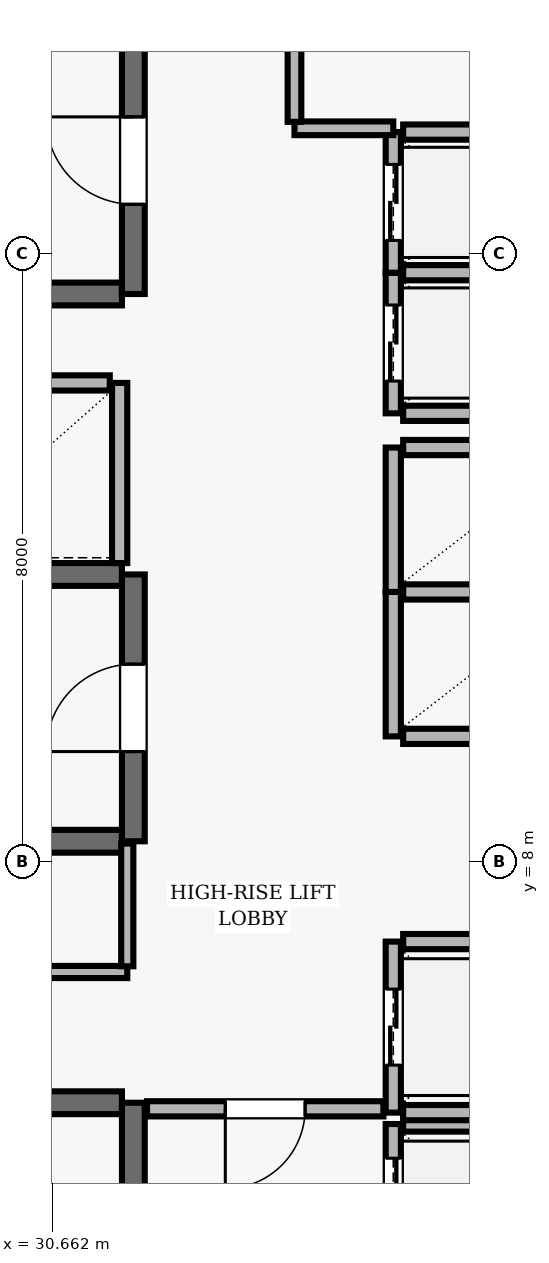
"""IFC4 building model, lengths in metres.
Left out: names, types, materials, properties, quantities, classifications, styles, units other than length and angle.
Written with IfcOpenShell. Run it as: python <this file> out.ifc"""

import sys

from ifc_helpers import new_model, si_unit, direction, frame, frame_2d, origin, place, context, subcontext, project, spatial, rectangle, extrude, element, fill, save


model = new_model("IFC4")
c1 = context("Model", 3, precision=1e-05, world=origin(), true_north=direction((0.0, 1.0)))
c2 = subcontext(c1, "Body", "Model", "MODEL_VIEW")
j1 = project(units=[si_unit("LENGTHUNIT", "METRE"), si_unit("PLANEANGLEUNIT", "RADIAN")], contexts=[c1])
p1 = place(None, origin())
s1 = spatial("IfcSite", under=j1, at=p1, CompositionType="ELEMENT")
p2 = place(p1, origin())
s2 = spatial("IfcBuilding", under=s1, at=p2, CompositionType="ELEMENT")
p3 = place(p2, frame((0.0, 0.0, 306.7)))
s3 = spatial("IfcBuildingStorey", under=s2, at=p3, CompositionType="ELEMENT", Elevation=306.7)
p4 = place(p3, frame((31.58, 4.83, 0.0), z_axis=(0.0, 0.0, 1.0), x_axis=(-1.0, 0.0, 0.0)))
e1 = element("IfcWall", 1, at=p4, inside=s3, PredefinedType="SHEAR", context=c2, shape_type="SweptSolid", body=[
    extrude(rectangle(XDim=8.36, YDim=0.3, at=frame_2d((4.18, 0.0))), origin(), (0.0, 0.0, 1.0), 4.74),
])
p5 = place(p3, frame((31.73, 0.96, 0.0), z_axis=(0.0, 0.0, 1.0), x_axis=(0.0, 1.0, 0.0)))
e2 = element("IfcWall", 2, at=p5, inside=s3, PredefinedType="SHEAR", context=c2, shape_type="SweptSolid", body=[
    extrude(rectangle(XDim=3.87, YDim=0.3, at=frame_2d((1.935, 0.0))), origin(), (0.0, 0.0, 1.0), 4.74),
])
p6 = place(p5, frame((1.54, 0.0, 0.0)))
e3 = element("IfcOpeningElement", 3, at=p6, cuts=e2, PredefinedType="OPENING", context=c2, shape_type="SweptSolid", body=[
    extrude(rectangle(XDim=1.15, YDim=2.15, at=frame_2d((0.575, 1.075))), frame((0.0, 0.16, 0.0), z_axis=(0.0, -1.0, 0.0), x_axis=(1.0, 0.0, 0.0)), (0.0, 0.0, 1.0), 0.32),
])
p7 = place(p3, frame((23.22, 15.47, 0.0), z_axis=(0.0, 0.0, 1.0), x_axis=(1.0, 0.0, 0.0)))
e4 = element("IfcWall", 4, at=p7, inside=s3, PredefinedType="SHEAR", context=c2, shape_type="SweptSolid", body=[
    extrude(rectangle(XDim=8.36, YDim=0.3, at=frame_2d((4.18, 0.0))), origin(), (0.0, 0.0, 1.0), 4.74),
])
p8 = place(p3, frame((31.73, 15.47, 0.0), z_axis=(0.0, 0.0, 1.0), x_axis=(0.0, 1.0, 0.0)))
e5 = element("IfcWall", 5, at=p8, inside=s3, PredefinedType="SHEAR", context=c2, shape_type="SweptSolid", body=[
    extrude(rectangle(XDim=3.51, YDim=0.3, at=frame_2d((1.755, 0.0))), origin(), (0.0, 0.0, 1.0), 4.74),
])
p9 = place(p8, frame((1.18, 0.0, 0.0)))
e6 = element("IfcOpeningElement", 6, at=p9, cuts=e5, PredefinedType="OPENING", context=c2, shape_type="SweptSolid", body=[
    extrude(rectangle(XDim=1.15, YDim=2.15, at=frame_2d((0.575, 1.075))), frame((0.0, 0.16, 0.0), z_axis=(0.0, -1.0, 0.0), x_axis=(1.0, 0.0, 0.0)), (0.0, 0.0, 1.0), 0.32),
])
for number, where, z_axis, x_axis in (
    (7, (31.58, 11.78, 0.0), (0.0, 0.0, 1.0), (-1.0, 0.0, 0.0)),
    (8, (23.22, 8.27, 0.0), (0.0, 0.0, 1.0), (1.0, 0.0, 0.0)),
):
    element("IfcWall", number, at=place(p3, frame(where, z_axis=z_axis, x_axis=x_axis)), inside=s3, PredefinedType="SHEAR", context=c2, shape_type="SweptSolid", body=[
        extrude(rectangle(XDim=8.36, YDim=0.3, at=frame_2d((4.18, 0.0))), origin(), (0.0, 0.0, 1.0), 4.74),
    ])
p10 = place(p3, frame((31.73, 8.27, 0.0), z_axis=(0.0, 0.0, 1.0), x_axis=(0.0, 1.0, 0.0)))
e9 = element("IfcWall", 9, at=p10, inside=s3, PredefinedType="SHEAR", context=c2, shape_type="SweptSolid", body=[
    extrude(rectangle(XDim=3.51, YDim=0.3, at=frame_2d((1.755, 0.0))), origin(), (0.0, 0.0, 1.0), 4.74),
])
p11 = place(p10, frame((1.18, 0.0, 0.0)))
e10 = element("IfcOpeningElement", 10, at=p11, cuts=e9, PredefinedType="OPENING", context=c2, shape_type="SweptSolid", body=[
    extrude(rectangle(XDim=1.15, YDim=2.15, at=frame_2d((0.575, 1.075))), frame((0.0, 0.16, 0.0), z_axis=(0.0, -1.0, 0.0), x_axis=(1.0, 0.0, 0.0)), (0.0, 0.0, 1.0), 0.32),
])
p12 = place(p3, frame((35.15, 4.55, 0.0), z_axis=(0.0, 0.0, 1.0), x_axis=(0.0, -1.0, 0.0)))
e11 = element("IfcWall", 11, at=p12, inside=s3, PredefinedType="SOLIDWALL", context=c2, shape_type="SweptSolid", body=[
    extrude(rectangle(XDim=2.1, YDim=0.2, at=frame_2d((1.05, 0.0))), origin(), (0.0, 0.0, 1.0), 4.74),
])
p13 = place(p12, frame((0.45, 0.0, 0.0)))
e12 = element("IfcOpeningElement", 12, at=p13, cuts=e11, PredefinedType="OPENING", context=c2, shape_type="SweptSolid", body=[
    extrude(rectangle(XDim=1.2, YDim=2.15, at=frame_2d((0.6, 1.075))), frame((0.0, 0.11, 0.0), z_axis=(0.0, -1.0, 0.0), x_axis=(1.0, 0.0, 0.0)), (0.0, 0.0, 1.0), 0.22),
])
p14 = place(p3, frame((37.42, 4.55, 0.0), z_axis=(0.0, 0.0, 1.0), x_axis=(-1.0, 0.0, 0.0)))
e13 = element("IfcWall", 13, at=p14, inside=s3, PredefinedType="SOLIDWALL", context=c2, shape_type="SweptSolid", body=[
    extrude(rectangle(XDim=2.14, YDim=0.2, at=frame_2d((1.07, 0.0))), origin(), (0.0, 0.0, 1.0), 4.74),
])
p15 = place(p3, frame((35.15, 6.95, 0.0), z_axis=(0.0, 0.0, 1.0), x_axis=(0.0, -1.0, 0.0)))
e14 = element("IfcWall", 14, at=p15, inside=s3, PredefinedType="SOLIDWALL", context=c2, shape_type="SweptSolid", body=[
    extrude(rectangle(XDim=2.25, YDim=0.2, at=frame_2d((1.125, 0.0))), origin(), (0.0, 0.0, 1.0), 4.74),
])
p16 = place(p15, frame((0.625, 0.0, 0.0)))
e15 = element("IfcOpeningElement", 15, at=p16, cuts=e14, PredefinedType="OPENING", context=c2, shape_type="SweptSolid", body=[
    extrude(rectangle(XDim=1.0, YDim=2.1, at=frame_2d((0.5, 1.05))), frame((0.0, 0.11, 0.0), z_axis=(0.0, -1.0, 0.0), x_axis=(1.0, 0.0, 0.0)), (0.0, 0.0, 1.0), 0.22),
])
for number, where, z_axis, x_axis in (
    (16, (35.28, 4.7, 0.0), (0.0, 0.0, 1.0), (1.0, 0.0, 0.0)),
    (17, (37.42, 6.95, 0.0), (0.0, 0.0, 1.0), (-1.0, 0.0, 0.0)),
):
    element("IfcWall", number, at=place(p3, frame(where, z_axis=z_axis, x_axis=x_axis)), inside=s3, PredefinedType="SOLIDWALL", context=c2, shape_type="SweptSolid", body=[
        extrude(rectangle(XDim=2.14, YDim=0.2, at=frame_2d((1.07, 0.0))), origin(), (0.0, 0.0, 1.0), 4.74),
    ])
p17 = place(p3, frame((35.15, 11.55, 0.0), z_axis=(0.0, 0.0, 1.0), x_axis=(0.0, -1.0, 0.0)))
e18 = element("IfcWall", 18, at=p17, inside=s3, PredefinedType="SOLIDWALL", context=c2, shape_type="SweptSolid", body=[
    extrude(rectangle(XDim=1.9, YDim=0.2, at=frame_2d((0.95, 0.0))), origin(), (0.0, 0.0, 1.0), 4.74),
])
for number, where, z_axis, x_axis in (
    (19, (35.28, 9.65, 0.0), (0.0, 0.0, 1.0), (1.0, 0.0, 0.0)),
    (20, (37.42, 11.55, 0.0), (0.0, 0.0, 1.0), (-1.0, 0.0, 0.0)),
):
    element("IfcWall", number, at=place(p3, frame(where, z_axis=z_axis, x_axis=x_axis)), inside=s3, PredefinedType="SOLIDWALL", context=c2, shape_type="SweptSolid", body=[
        extrude(rectangle(XDim=2.14, YDim=0.2, at=frame_2d((1.07, 0.0))), origin(), (0.0, 0.0, 1.0), 4.74),
    ])
p18 = place(p3, frame((35.15, 13.45, 0.0), z_axis=(0.0, 0.0, 1.0), x_axis=(0.0, -1.0, 0.0)))
e21 = element("IfcWall", 21, at=p18, inside=s3, PredefinedType="SOLIDWALL", context=c2, shape_type="SweptSolid", body=[
    extrude(rectangle(XDim=1.9, YDim=0.2, at=frame_2d((0.95, 0.0))), origin(), (0.0, 0.0, 1.0), 4.74),
])
p19 = place(p3, frame((37.42, 13.45, 0.0), z_axis=(0.0, 0.0, 1.0), x_axis=(-1.0, 0.0, 0.0)))
e22 = element("IfcWall", 22, at=p19, inside=s3, PredefinedType="SOLIDWALL", context=c2, shape_type="SweptSolid", body=[
    extrude(rectangle(XDim=2.14, YDim=0.2, at=frame_2d((1.07, 0.0))), origin(), (0.0, 0.0, 1.0), 4.74),
])
p20 = place(p3, frame((31.55, 11.93, 0.0), z_axis=(0.0, 0.0, 1.0), x_axis=(0.0, 1.0, 0.0)))
e23 = element("IfcWall", 23, at=p20, inside=s3, PredefinedType="SOLIDWALL", context=c2, shape_type="SweptSolid", body=[
    extrude(rectangle(XDim=2.37, YDim=0.2, at=frame_2d((1.185, 0.0))), origin(), (0.0, 0.0, 1.0), 4.74),
])
p21 = place(p3, frame((31.42, 14.3, 0.0), z_axis=(0.0, 0.0, 1.0), x_axis=(-1.0, 0.0, 0.0)))
e24 = element("IfcWall", 24, at=p21, inside=s3, PredefinedType="SOLIDWALL", context=c2, shape_type="SweptSolid", body=[
    extrude(rectangle(XDim=2.44, YDim=0.2, at=frame_2d((1.22, 0.0))), origin(), (0.0, 0.0, 1.0), 4.74),
])
p22 = place(p3, frame((35.15, 15.75, 0.0), z_axis=(0.0, 0.0, 1.0), x_axis=(0.0, -1.0, 0.0)))
e25 = element("IfcWall", 25, at=p22, inside=s3, PredefinedType="SOLIDWALL", context=c2, shape_type="SweptSolid", body=[
    extrude(rectangle(XDim=1.85, YDim=0.2, at=frame_2d((0.925, 0.0))), origin(), (0.0, 0.0, 1.0), 4.74),
])
p23 = place(p22, frame((0.425, 0.0, 0.0)))
e26 = element("IfcOpeningElement", 26, at=p23, cuts=e25, PredefinedType="OPENING", context=c2, shape_type="SweptSolid", body=[
    extrude(rectangle(XDim=1.0, YDim=2.1, at=frame_2d((0.5, 1.05))), frame((0.0, 0.11, 0.0), z_axis=(0.0, -1.0, 0.0), x_axis=(1.0, 0.0, 0.0)), (0.0, 0.0, 1.0), 0.22),
])
for number, where, z_axis, x_axis in (
    (27, (35.28, 13.9, 0.0), (0.0, 0.0, 1.0), (1.0, 0.0, 0.0)),
    (28, (37.42, 15.75, 0.0), (0.0, 0.0, 1.0), (-1.0, 0.0, 0.0)),
):
    element("IfcWall", number, at=place(p3, frame(where, z_axis=z_axis, x_axis=x_axis)), inside=s3, PredefinedType="SOLIDWALL", context=c2, shape_type="SweptSolid", body=[
        extrude(rectangle(XDim=2.14, YDim=0.2, at=frame_2d((1.07, 0.0))), origin(), (0.0, 0.0, 1.0), 4.74),
    ])
p24 = place(p3, frame((35.15, 17.6, 0.0), z_axis=(0.0, 0.0, 1.0), x_axis=(0.0, -1.0, 0.0)))
e29 = element("IfcWall", 29, at=p24, inside=s3, PredefinedType="SOLIDWALL", context=c2, shape_type="SweptSolid", body=[
    extrude(rectangle(XDim=1.85, YDim=0.2, at=frame_2d((0.925, 0.0))), origin(), (0.0, 0.0, 1.0), 4.74),
])
p25 = place(p24, frame((0.425, 0.0, 0.0)))
e30 = element("IfcOpeningElement", 30, at=p25, cuts=e29, PredefinedType="OPENING", context=c2, shape_type="SweptSolid", body=[
    extrude(rectangle(XDim=1.0, YDim=2.1, at=frame_2d((0.5, 1.05))), frame((0.0, 0.11, 0.0), z_axis=(0.0, -1.0, 0.0), x_axis=(1.0, 0.0, 0.0)), (0.0, 0.0, 1.0), 0.22),
])
p26 = place(p3, frame((37.42, 17.6, 0.0), z_axis=(0.0, 0.0, 1.0), x_axis=(-1.0, 0.0, 0.0)))
e31 = element("IfcWall", 31, at=p26, inside=s3, PredefinedType="SOLIDWALL", context=c2, shape_type="SweptSolid", body=[
    extrude(rectangle(XDim=2.14, YDim=0.2, at=frame_2d((1.07, 0.0))), origin(), (0.0, 0.0, 1.0), 4.74),
])
p27 = place(p3, frame((31.65, 6.55, 0.0), z_axis=(0.0, 0.0, 1.0), x_axis=(-1.0, 0.0, 0.0)))
e32 = element("IfcWall", 32, at=p27, inside=s3, PredefinedType="PARTITIONING", context=c2, shape_type="SweptSolid", body=[
    extrude(rectangle(XDim=4.75, YDim=0.16, at=frame_2d((2.375, 0.0))), origin(), (0.0, 0.0, 1.0), 4.74),
])
p28 = place(p27, frame((1.935, 0.0, 0.0)))
e33 = element("IfcOpeningElement", 33, at=p28, cuts=e32, PredefinedType="OPENING", context=c2, shape_type="SweptSolid", body=[
    extrude(rectangle(XDim=0.88, YDim=2.1, at=frame_2d((0.44, 1.05))), frame((0.0, 0.09, 0.0), z_axis=(0.0, -1.0, 0.0), x_axis=(1.0, 0.0, 0.0)), (0.0, 0.0, 1.0), 0.18),
])
p29 = place(p3, frame((33.85, 17.65, 0.0), z_axis=(0.0, 0.0, 1.0), x_axis=(1.0, 0.0, 0.0)))
e34 = element("IfcWall", 34, at=p29, inside=s3, PredefinedType="PARTITIONING", context=c2, shape_type="SweptSolid", body=[
    extrude(rectangle(XDim=1.3, YDim=0.18, at=frame_2d((0.65, 0.0))), origin(), (0.0, 0.0, 1.0), 4.74),
])
p30 = place(p3, frame((35.02, 4.75, 0.0), z_axis=(0.0, 0.0, 1.0), x_axis=(-1.0, 0.0, 0.0)))
e35 = element("IfcWall", 35, at=p30, inside=s3, PredefinedType="SOLIDWALL", context=c2, shape_type="SweptSolid", body=[
    extrude(rectangle(XDim=3.11, YDim=0.2, at=frame_2d((1.555, 0.0))), origin(), (0.0, 0.0, 1.0), 4.74),
])
p31 = place(p30, frame((1.03, 0.0, 0.0)))
e36 = element("IfcOpeningElement", 36, at=p31, cuts=e35, PredefinedType="OPENING", context=c2, shape_type="SweptSolid", body=[
    extrude(rectangle(XDim=1.05, YDim=2.15, at=frame_2d((0.525, 1.075))), frame((0.0, 0.11, 0.0), z_axis=(0.0, -1.0, 0.0), x_axis=(1.0, 0.0, 0.0)), (0.0, 0.0, 1.0), 0.22),
])
p32 = place(p3, frame((31.65, 8.24, 0.0), z_axis=(0.0, 0.0, 1.0), x_axis=(0.0, -1.0, 0.0)))
e37 = element("IfcWall", 37, at=p32, inside=s3, PredefinedType="PARTITIONING", context=c2, shape_type="SweptSolid", body=[
    extrude(rectangle(XDim=1.615, YDim=0.16, at=frame_2d((0.808, 0.0))), origin(), (0.0, 0.0, 1.0), 4.74),
])
p33 = place(p3, frame((33.85, 17.735, 0.0), z_axis=(0.0, 0.0, 1.0), x_axis=(0.0, 1.0, 0.0)))
e38 = element("IfcWall", 38, at=p33, inside=s3, PredefinedType="PARTITIONING", context=c2, shape_type="SweptSolid", body=[
    extrude(rectangle(XDim=2.93, YDim=0.18, at=frame_2d((1.465, 0.0))), origin(), (0.0, 0.0, 1.0), 4.74),
])
p34 = place(p33, frame((0.99, 0.0, 0.0)))
e39 = element("IfcOpeningElement", 39, at=p34, cuts=e38, PredefinedType="OPENING", context=c2, shape_type="SweptSolid", body=[
    extrude(rectangle(XDim=0.95, YDim=2.1, at=frame_2d((0.475, 1.05))), frame((0.0, 0.1, 0.0), z_axis=(0.0, -1.0, 0.0), x_axis=(1.0, 0.0, 0.0)), (0.0, 0.0, 1.0), 0.2),
])
p35 = place(p9, origin())
e40 = element("IfcDoor", 40, at=p35, inside=s3, OperationType="SINGLE_SWING_RIGHT", PredefinedType="DOOR", context=c2, shape_type="SweptSolid", body=[
    extrude(rectangle(XDim=1.15, YDim=2.15, at=frame_2d((0.575, 1.075))), frame((0.0, 0.025, 0.0), z_axis=(0.0, -1.0, 0.0), x_axis=(1.0, 0.0, 0.0)), (0.0, 0.0, 1.0), 0.05),
])
fill(e6, e40)
p36 = place(p11, origin())
e41 = element("IfcDoor", 41, at=p36, inside=s3, OperationType="SINGLE_SWING_LEFT", PredefinedType="DOOR", context=c2, shape_type="SweptSolid", body=[
    extrude(rectangle(XDim=1.15, YDim=2.15, at=frame_2d((0.575, 1.075))), frame((0.0, 0.025, 0.0), z_axis=(0.0, -1.0, 0.0), x_axis=(1.0, 0.0, 0.0)), (0.0, 0.0, 1.0), 0.05),
])
fill(e10, e41)
p37 = place(p13, origin())
e42 = element("IfcDoor", 42, at=p37, inside=s3, OperationType="DOUBLE_DOOR_SLIDING", PredefinedType="DOOR", context=c2, shape_type="SweptSolid", body=[
    extrude(rectangle(XDim=1.2, YDim=2.15, at=frame_2d((0.6, 1.075))), frame((0.0, 0.025, 0.0), z_axis=(0.0, -1.0, 0.0), x_axis=(1.0, 0.0, 0.0)), (0.0, 0.0, 1.0), 0.05),
])
fill(e12, e42)
p38 = place(p16, origin())
e43 = element("IfcDoor", 43, at=p38, inside=s3, OperationType="DOUBLE_DOOR_SLIDING", PredefinedType="DOOR", context=c2, shape_type="SweptSolid", body=[
    extrude(rectangle(XDim=1.0, YDim=2.1, at=frame_2d((0.5, 1.05))), frame((0.0, 0.025, 0.0), z_axis=(0.0, -1.0, 0.0), x_axis=(1.0, 0.0, 0.0)), (0.0, 0.0, 1.0), 0.05),
])
fill(e15, e43)
p39 = place(p23, origin())
e44 = element("IfcDoor", 44, at=p39, inside=s3, OperationType="DOUBLE_DOOR_SLIDING", PredefinedType="DOOR", context=c2, shape_type="SweptSolid", body=[
    extrude(rectangle(XDim=1.0, YDim=2.1, at=frame_2d((0.5, 1.05))), frame((0.0, 0.025, 0.0), z_axis=(0.0, -1.0, 0.0), x_axis=(1.0, 0.0, 0.0)), (0.0, 0.0, 1.0), 0.05),
])
fill(e26, e44)
p40 = place(p25, origin())
e45 = element("IfcDoor", 45, at=p40, inside=s3, OperationType="DOUBLE_DOOR_SLIDING", PredefinedType="DOOR", context=c2, shape_type="SweptSolid", body=[
    extrude(rectangle(XDim=1.0, YDim=2.1, at=frame_2d((0.5, 1.05))), frame((0.0, 0.025, 0.0), z_axis=(0.0, -1.0, 0.0), x_axis=(1.0, 0.0, 0.0)), (0.0, 0.0, 1.0), 0.05),
])
fill(e30, e45)
p41 = place(p31, origin())
e46 = element("IfcDoor", 46, at=p41, inside=s3, OperationType="SINGLE_SWING_RIGHT", PredefinedType="DOOR", context=c2, shape_type="SweptSolid", body=[
    extrude(rectangle(XDim=1.05, YDim=2.15, at=frame_2d((0.525, 1.075))), frame((0.0, 0.025, 0.0), z_axis=(0.0, -1.0, 0.0), x_axis=(1.0, 0.0, 0.0)), (0.0, 0.0, 1.0), 0.05),
])
fill(e36, e46)
save(model, sys.argv[1])
